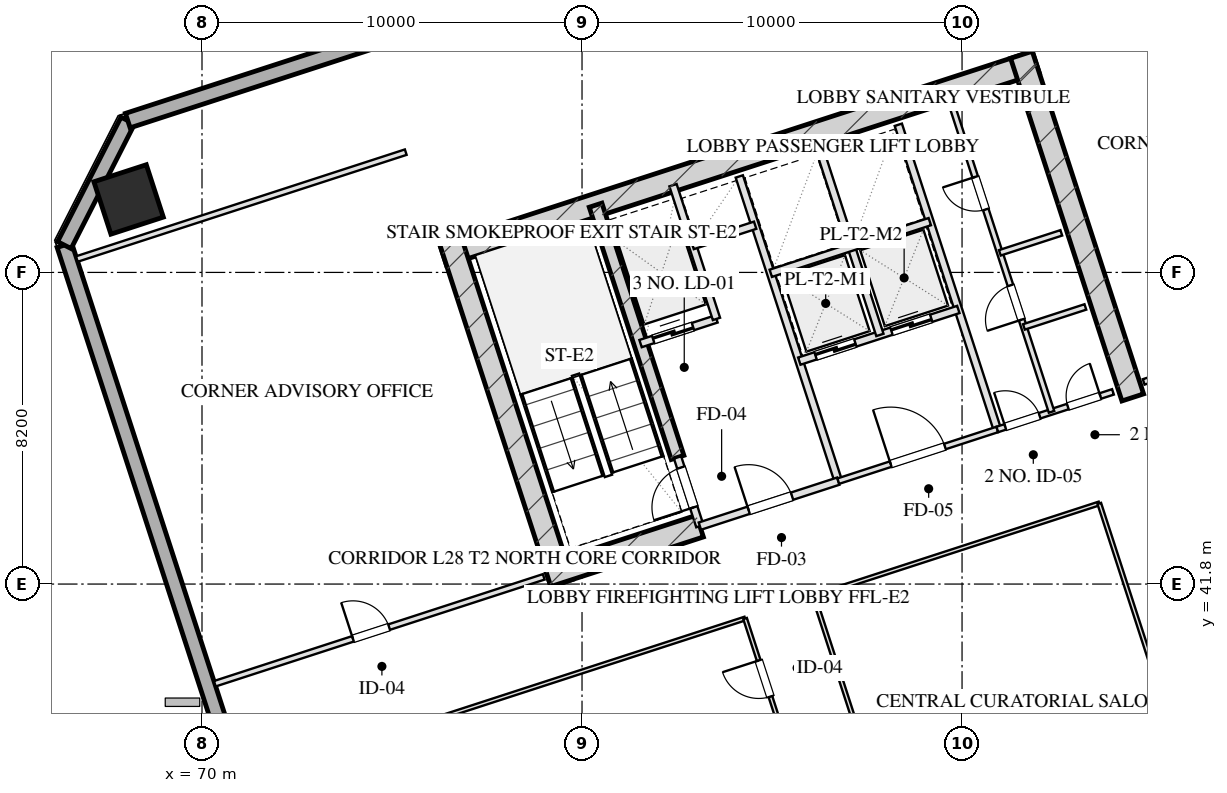
"""IFC4 building model, lengths in metres.
Left out: names, types, materials, properties, quantities, classifications, styles, units other than length and angle.
Written with IfcOpenShell. Run it as: python <this file> out.ifc"""

import sys

from ifc_helpers import new_model, si_unit, direction, frame, frame_2d, origin, origin_2d, place, context, subcontext, project, spatial, rectangle, hollow_rectangle, extrude, element, fill, save


model = new_model("IFC4")
c1 = context("Model", 3, precision=1e-05, world=origin(), true_north=direction((0.0, 1.0)))
c2 = subcontext(c1, "Body", "Model", "MODEL_VIEW")
j1 = project(units=[si_unit("LENGTHUNIT", "METRE"), si_unit("PLANEANGLEUNIT", "RADIAN")], contexts=[c1])
p1 = place(None, origin())
s1 = spatial("IfcSite", under=j1, at=p1, CompositionType="ELEMENT")
p2 = place(p1, origin())
s2 = spatial("IfcBuilding", under=s1, at=p2, CompositionType="ELEMENT")
p3 = place(p2, frame((0.0, 0.0, 110.4)))
s3 = spatial("IfcBuildingStorey", under=s2, at=p3, CompositionType="ELEMENT", Elevation=110.4)
p4 = place(p3, frame((76.344, 50.466, 0.0), z_axis=(0.0, 0.0, 1.0), x_axis=(0.951055727519, 0.309019421968, 0.0)))
e1 = element("IfcWall", 1, at=p4, inside=s3, PredefinedType="SHEAR", context=c2, shape_type="SweptSolid", body=[
    extrude(rectangle(XDim=16.4, YDim=0.6, at=frame_2d((8.2, 0.0))), origin(), (0.0, 0.0, 1.0), 3.45),
])
for number, where, z_axis, x_axis in (
    (2, (79.466, 41.828, 0.0), (0.0, 0.0, 1.0), (-0.309, 0.951, 0.0)),
    (3, (94.492, 46.71, 0.0), (0.0, 0.0, 1.0), (-0.309, 0.951, 0.0)),
):
    element("IfcWall", number, at=place(p3, frame(where, z_axis=z_axis, x_axis=x_axis)), inside=s3, PredefinedType="SHEAR", context=c2, shape_type="SweptSolid", body=[
        extrude(rectangle(XDim=9.48, YDim=0.6, at=frame_2d((4.74, 0.0))), origin(), (0.0, 0.0, 1.0), 3.45),
    ])
p5 = place(p3, frame((82.514, 45.131, 0.0), z_axis=(0.0, 0.0, 1.0), x_axis=(-0.308988790936, 0.951065679686, 0.0)))
e4 = element("IfcWall", 4, at=p5, inside=s3, PredefinedType="SHEAR", context=c2, shape_type="SweptSolid", body=[
    extrude(rectangle(XDim=6.98, YDim=0.35, at=frame_2d((3.49, 0.0))), origin(), (0.0, 0.0, 1.0), 3.45),
])
p6 = place(p3, frame((79.087, 42.021, 0.0), z_axis=(0.0, 0.0, 1.0), x_axis=(0.951062550203, 0.3089984233, 0.0)))
e5 = element("IfcWall", 5, at=p6, inside=s3, PredefinedType="SHEAR", context=c2, shape_type="SweptSolid", body=[
    extrude(rectangle(XDim=4.22, YDim=0.6, at=frame_2d((2.11, 0.0))), origin(), (0.0, 0.0, 1.0), 3.45),
])
p7 = place(p3, frame((68.069, 51.92, 0.0), z_axis=(0.0, 0.0, 1.0), x_axis=(0.951056516295, 0.309016994375, 0.0)))
e6 = element("IfcColumn", 6, at=p7, inside=s3, PredefinedType="COLUMN", context=c2, shape_type="SweptSolid", body=[
    extrude(hollow_rectangle(XDim=1.45, YDim=1.45, WallThickness=0.05, at=origin_2d()), origin(), (0.0, 0.0, 1.0), 3.451),
])
p8 = place(p3, frame((80.716, 6.59, 0.0), z_axis=(0.0, 0.0, 1.0), x_axis=(-0.309017542002, 0.95105633836, 0.0)))
e7 = element("IfcWall", 7, at=p8, inside=s3, PredefinedType="SOLIDWALL", context=c2, shape_type="SweptSolid", body=[
    extrude(rectangle(XDim=46.4, YDim=0.4, at=frame_2d((23.2, 0.0))), origin(), (0.0, 0.0, 1.0), 2.61),
])
p9 = place(p8, frame((20.05, 0.0, 0.0)))
e8 = element("IfcOpeningElement", 8, at=p9, cuts=e7, PredefinedType="OPENING", context=c2, shape_type="SweptSolid", body=[
    extrude(rectangle(XDim=1.1, YDim=2.15, at=frame_2d((0.55, 1.075))), frame((0.0, 0.21, 0.0), z_axis=(0.0, -1.0, 0.0), x_axis=(1.0, 0.0, 0.0)), (0.0, 0.0, 1.0), 0.42),
])
p10 = place(p3, frame((66.377, 50.719, 0.0), z_axis=(0.0, 0.0, 1.0), x_axis=(0.454026238093, 0.890988313685, 0.0)))
e9 = element("IfcWall", 9, at=p10, inside=s3, PredefinedType="SOLIDWALL", context=c2, shape_type="SweptSolid", body=[
    extrude(rectangle(XDim=3.677, YDim=0.4, at=frame_2d((1.838, 0.0))), origin(), (0.0, 0.0, 1.0), 2.61),
])
p11 = place(p3, frame((68.047, 53.995, 0.0), z_axis=(0.0, 0.0, 1.0), x_axis=(0.95105505922, 0.309021478754, 0.0)))
e10 = element("IfcWall", 10, at=p11, inside=s3, PredefinedType="SOLIDWALL", context=c2, shape_type="SweptSolid", body=[
    extrude(rectangle(XDim=29.4, YDim=0.4, at=frame_2d((14.7, 0.0))), origin(), (0.0, 0.0, 1.0), 2.61),
])
p12 = place(p3, frame((83.101, 43.324, 0.0), z_axis=(0.0, 0.0, 1.0), x_axis=(-0.309048298632, 0.951046344356, 0.0)))
e11 = element("IfcWall", 11, at=p12, inside=s3, PredefinedType="PARTITIONING", context=c2, shape_type="SweptSolid", body=[
    extrude(rectangle(XDim=1.9, YDim=0.2, at=frame_2d((0.95, 0.0))), origin(), (0.0, 0.0, 1.0), 3.175),
])
p13 = place(p12, frame((0.52, 0.0, 0.0)))
e12 = element("IfcOpeningElement", 12, at=p13, cuts=e11, PredefinedType="OPENING", context=c2, shape_type="SweptSolid", body=[
    extrude(rectangle(XDim=1.1, YDim=2.05, at=frame_2d((0.55, 1.025))), frame((0.0, 0.11, 0.0), z_axis=(0.0, -1.0, 0.0), x_axis=(1.0, 0.0, 0.0)), (0.0, 0.0, 1.0), 0.22),
])
p14 = place(p3, frame((86.743, 44.508, 0.0), z_axis=(0.0, 0.0, 1.0), x_axis=(-0.309016001439, 0.951056838919, 0.0)))
e13 = element("IfcWall", 13, at=p14, inside=s3, PredefinedType="PARTITIONING", context=c2, shape_type="SweptSolid", body=[
    extrude(rectangle(XDim=8.43, YDim=0.2, at=frame_2d((4.215, 0.0))), origin(), (0.0, 0.0, 1.0), 3.175),
])
p15 = place(p3, frame((83.101, 43.324, 0.0), z_axis=(0.0, 0.0, 1.0), x_axis=(0.951052804469, 0.309028417967, 0.0)))
e14 = element("IfcWall", 14, at=p15, inside=s3, PredefinedType="PARTITIONING", context=c2, shape_type="SweptSolid", body=[
    extrude(rectangle(XDim=3.83, YDim=0.2, at=frame_2d((1.915, 0.0))), origin(), (0.0, 0.0, 1.0), 3.175),
])
p16 = place(p15, frame((1.35, 0.0, 0.0)))
e15 = element("IfcOpeningElement", 15, at=p16, cuts=e14, PredefinedType="OPENING", context=c2, shape_type="SweptSolid", body=[
    extrude(rectangle(XDim=1.2, YDim=2.05, at=frame_2d((0.6, 1.025))), frame((0.0, 0.11, 0.0), z_axis=(0.0, -1.0, 0.0), x_axis=(1.0, 0.0, 0.0)), (0.0, 0.0, 1.0), 0.22),
])
p17 = place(p3, frame((81.54, 48.127, 0.0), z_axis=(0.0, 0.0, 1.0), x_axis=(0.951062257173, 0.308999325213, 0.0)))
e16 = element("IfcWall", 16, at=p17, inside=s3, PredefinedType="PARTITIONING", context=c2, shape_type="SweptSolid", body=[
    extrude(rectangle(XDim=2.1, YDim=0.2, at=frame_2d((1.05, 0.0))), origin(), (0.0, 0.0, 1.0), 3.175),
])
p18 = place(p17, frame((0.35, 0.0, 0.0)))
e17 = element("IfcOpeningElement", 17, at=p18, cuts=e16, PredefinedType="OPENING", context=c2, shape_type="SweptSolid", body=[
    extrude(rectangle(XDim=1.1, YDim=2.05, at=frame_2d((0.55, 1.025))), frame((0.0, 0.11, 0.0), z_axis=(0.0, -1.0, 0.0), x_axis=(1.0, 0.0, 0.0)), (0.0, 0.0, 1.0), 0.22),
])
p19 = place(p3, frame((83.538, 48.776, 0.0), z_axis=(0.0, 0.0, 1.0), x_axis=(-0.3089935693, 0.951064127245, 0.0)))
e18 = element("IfcWall", 18, at=p19, inside=s3, PredefinedType="PARTITIONING", context=c2, shape_type="SweptSolid", body=[
    extrude(rectangle(XDim=3.7, YDim=0.2, at=frame_2d((1.85, 0.0))), origin(), (0.0, 0.0, 1.0), 3.175),
])
p20 = place(p3, frame((82.91, 50.707, 0.0), z_axis=(0.0, 0.0, 1.0), x_axis=(0.951041328149, 0.309063734775, 0.0)))
e19 = element("IfcWall", 19, at=p20, inside=s3, PredefinedType="PARTITIONING", context=c2, shape_type="SweptSolid", body=[
    extrude(rectangle(XDim=1.73, YDim=0.2, at=frame_2d((0.865, 0.0))), origin(), (0.0, 0.0, 1.0), 3.175),
])
p21 = place(p3, frame((90.928, 45.868, 0.0), z_axis=(0.0, 0.0, 1.0), x_axis=(-0.309042196757, 0.951048327176, 0.0)))
e20 = element("IfcWall", 20, at=p21, inside=s3, PredefinedType="PARTITIONING", context=c2, shape_type="SweptSolid", body=[
    extrude(rectangle(XDim=8.43, YDim=0.2, at=frame_2d((4.215, 0.0))), origin(), (0.0, 0.0, 1.0), 3.175),
])
p22 = place(p3, frame((86.743, 44.508, 0.0), z_axis=(0.0, 0.0, 1.0), x_axis=(0.951063829732, 0.308994485023, 0.0)))
e21 = element("IfcWall", 21, at=p22, inside=s3, PredefinedType="PARTITIONING", context=c2, shape_type="SweptSolid", body=[
    extrude(rectangle(XDim=4.4, YDim=0.15, at=frame_2d((2.2, 0.0))), origin(), (0.0, 0.0, 1.0), 3.175),
])
p23 = place(p22, frame((1.45, 0.0, 0.0)))
e22 = element("IfcOpeningElement", 22, at=p23, cuts=e21, PredefinedType="OPENING", context=c2, shape_type="SweptSolid", body=[
    extrude(rectangle(XDim=1.5, YDim=2.05, at=frame_2d((0.75, 1.025))), frame((0.0, 0.085, 0.0), z_axis=(0.0, -1.0, 0.0), x_axis=(1.0, 0.0, 0.0)), (0.0, 0.0, 1.0), 0.17),
])
p24 = place(p3, frame((85.718, 47.666, 0.0), z_axis=(0.0, 0.0, 1.0), x_axis=(0.951058531764, 0.30901079133, 0.0)))
e23 = element("IfcWall", 23, at=p24, inside=s3, PredefinedType="PARTITIONING", context=c2, shape_type="SweptSolid", body=[
    extrude(rectangle(XDim=4.4, YDim=0.2, at=frame_2d((2.2, 0.0))), origin(), (0.0, 0.0, 1.0), 3.175),
])
p25 = place(p24, frame((0.45, 0.0, 0.0)))
e24 = element("IfcOpeningElement", 24, at=p25, cuts=e23, PredefinedType="OPENING", context=c2, shape_type="SweptSolid", body=[
    extrude(rectangle(XDim=1.1, YDim=2.05, at=frame_2d((0.55, 1.025))), frame((0.0, 0.11, 0.0), z_axis=(0.0, -1.0, 0.0), x_axis=(1.0, 0.0, 0.0)), (0.0, 0.0, 1.0), 0.22),
])
p26 = place(p24, frame((2.55, 0.0, 0.0)))
e25 = element("IfcOpeningElement", 25, at=p26, cuts=e23, PredefinedType="OPENING", context=c2, shape_type="SweptSolid", body=[
    extrude(rectangle(XDim=1.1, YDim=2.05, at=frame_2d((0.55, 1.025))), frame((0.0, 0.11, 0.0), z_axis=(0.0, -1.0, 0.0), x_axis=(1.0, 0.0, 0.0)), (0.0, 0.0, 1.0), 0.22),
])
p27 = place(p3, frame((87.838, 48.354, 0.0), z_axis=(0.0, 0.0, 1.0), x_axis=(-0.3090093719, 0.951058992953, 0.0)))
e26 = element("IfcWall", 26, at=p27, inside=s3, PredefinedType="PARTITIONING", context=c2, shape_type="SweptSolid", body=[
    extrude(rectangle(XDim=5.11, YDim=0.2, at=frame_2d((2.555, 0.0))), origin(), (0.0, 0.0, 1.0), 3.175),
])
p28 = place(p3, frame((84.967, 49.977, 0.0), z_axis=(0.0, 0.0, 1.0), x_axis=(0.951063829732, 0.308994485023, 0.0)))
e27 = element("IfcWall", 27, at=p28, inside=s3, PredefinedType="PARTITIONING", context=c2, shape_type="SweptSolid", body=[
    extrude(rectangle(XDim=4.4, YDim=0.2, at=frame_2d((2.2, 0.0))), origin(), (0.0, 0.0, 1.0), 3.175),
])
p29 = place(p3, frame((90.928, 45.868, 0.0), z_axis=(0.0, 0.0, 1.0), x_axis=(0.951059297078, 0.309008435874, 0.0)))
e28 = element("IfcWall", 28, at=p29, inside=s3, PredefinedType="PARTITIONING", context=c2, shape_type="SweptSolid", body=[
    extrude(rectangle(XDim=3.2, YDim=0.15, at=frame_2d((1.6, 0.0))), origin(), (0.0, 0.0, 1.0), 3.175),
])
p30 = place(p29, frame((0.22, 0.0, 0.0)))
e29 = element("IfcOpeningElement", 29, at=p30, cuts=e28, PredefinedType="OPENING", context=c2, shape_type="SweptSolid", body=[
    extrude(rectangle(XDim=0.95, YDim=2.05, at=frame_2d((0.475, 1.025))), frame((0.0, 0.085, 0.0), z_axis=(0.0, -1.0, 0.0), x_axis=(1.0, 0.0, 0.0)), (0.0, 0.0, 1.0), 0.17),
])
p31 = place(p29, frame((1.95, 0.0, 0.0)))
e30 = element("IfcOpeningElement", 30, at=p31, cuts=e28, PredefinedType="OPENING", context=c2, shape_type="SweptSolid", body=[
    extrude(rectangle(XDim=0.9, YDim=2.05, at=frame_2d((0.45, 1.025))), frame((0.0, 0.085, 0.0), z_axis=(0.0, -1.0, 0.0), x_axis=(1.0, 0.0, 0.0)), (0.0, 0.0, 1.0), 0.17),
])
p32 = place(p3, frame((92.355, 46.331, 0.0), z_axis=(0.0, 0.0, 1.0), x_axis=(-0.309007490203, 0.951059604335, 0.0)))
e31 = element("IfcWall", 31, at=p32, inside=s3, PredefinedType="PARTITIONING", context=c2, shape_type="SweptSolid", body=[
    extrude(rectangle(XDim=8.43, YDim=0.15, at=frame_2d((4.215, 0.0))), origin(), (0.0, 0.0, 1.0), 3.175),
])
p33 = place(p32, frame((2.55, 0.0, 0.0)))
e32 = element("IfcOpeningElement", 32, at=p33, cuts=e31, PredefinedType="OPENING", context=c2, shape_type="SweptSolid", body=[
    extrude(rectangle(XDim=0.95, YDim=2.05, at=frame_2d((0.475, 1.025))), frame((0.0, 0.085, 0.0), z_axis=(0.0, -1.0, 0.0), x_axis=(1.0, 0.0, 0.0)), (0.0, 0.0, 1.0), 0.17),
])
p34 = place(p32, frame((5.6, 0.0, 0.0)))
e33 = element("IfcOpeningElement", 33, at=p34, cuts=e31, PredefinedType="OPENING", context=c2, shape_type="SweptSolid", body=[
    extrude(rectangle(XDim=0.9, YDim=2.05, at=frame_2d((0.45, 1.025))), frame((0.0, 0.085, 0.0), z_axis=(0.0, -1.0, 0.0), x_axis=(1.0, 0.0, 0.0)), (0.0, 0.0, 1.0), 0.17),
])
p35 = place(p3, frame((90.995, 50.516, 0.0), z_axis=(0.0, 0.0, 1.0), x_axis=(0.951040401051, 0.309066587596, 0.0)))
e34 = element("IfcWall", 34, at=p35, inside=s3, PredefinedType="PARTITIONING", context=c2, shape_type="SweptSolid", body=[
    extrude(rectangle(XDim=1.7, YDim=0.15, at=frame_2d((0.85, 0.0))), origin(), (0.0, 0.0, 1.0), 3.175),
])
p36 = place(p3, frame((91.628, 48.566, 0.0), z_axis=(0.0, 0.0, 1.0), x_axis=(0.951054116971, 0.309024378638, 0.0)))
e35 = element("IfcWall", 35, at=p36, inside=s3, PredefinedType="PARTITIONING", context=c2, shape_type="SweptSolid", body=[
    extrude(rectangle(XDim=1.7, YDim=0.15, at=frame_2d((0.85, 0.0))), origin(), (0.0, 0.0, 1.0), 3.175),
])
p37 = place(p3, frame((66.707, 50.352, 0.0), z_axis=(0.0, 0.0, 1.0), x_axis=(0.951057133767, 0.309015093986, 0.0)))
e36 = element("IfcWall", 36, at=p37, inside=s3, PredefinedType="PARTITIONING", context=c2, shape_type="SweptSolid", body=[
    extrude(rectangle(XDim=9.1, YDim=0.15, at=frame_2d((4.55, 0.0))), origin(), (0.0, 0.0, 1.0), 3.175),
])
p38 = place(p3, frame((70.338, 39.177, 0.0), z_axis=(0.0, 0.0, 1.0), x_axis=(0.951059695568, 0.309007209409, 0.0)))
e37 = element("IfcWall", 37, at=p38, inside=s3, PredefinedType="PARTITIONING", context=c2, shape_type="SweptSolid", body=[
    extrude(rectangle(XDim=9.1, YDim=0.15, at=frame_2d((4.55, 0.0))), origin(), (0.0, 0.0, 1.0), 3.175),
])
p39 = place(p38, frame((3.822, 0.0, 0.0)))
e38 = element("IfcOpeningElement", 38, at=p39, cuts=e37, PredefinedType="OPENING", context=c2, shape_type="SweptSolid", body=[
    extrude(rectangle(XDim=1.0, YDim=2.05, at=frame_2d((0.5, 1.025))), frame((0.0, 0.085, 0.0), z_axis=(0.0, -1.0, 0.0), x_axis=(1.0, 0.0, 0.0)), (0.0, 0.0, 1.0), 0.17),
])
p40 = place(p3, frame((94.78, 47.119, 0.0), z_axis=(0.0, 0.0, 1.0), x_axis=(0.951054329824, 0.309023723562, 0.0)))
e39 = element("IfcWall", 39, at=p40, inside=s3, PredefinedType="PARTITIONING", context=c2, shape_type="SweptSolid", body=[
    extrude(rectangle(XDim=8.5, YDim=0.15, at=frame_2d((4.25, 0.0))), origin(), (0.0, 0.0, 1.0), 3.175),
])
p41 = place(p40, frame((3.57, 0.0, 0.0)))
e40 = element("IfcOpeningElement", 40, at=p41, cuts=e39, PredefinedType="OPENING", context=c2, shape_type="SweptSolid", body=[
    extrude(rectangle(XDim=1.05, YDim=2.05, at=frame_2d((0.525, 1.025))), frame((0.0, 0.085, 0.0), z_axis=(0.0, -1.0, 0.0), x_axis=(1.0, 0.0, 0.0)), (0.0, 0.0, 1.0), 0.17),
])
p42 = place(p3, frame((71.166, 36.629, 0.0), z_axis=(0.0, 0.0, 1.0), x_axis=(0.951056688031, 0.309016465825, 0.0)))
e41 = element("IfcWall", 41, at=p42, inside=s3, PredefinedType="MOVABLE", context=c2, shape_type="SweptSolid", body=[
    extrude(rectangle(XDim=13.8, YDim=0.1, at=frame_2d((6.9, 0.0))), origin(), (0.0, 0.0, 1.0), 3.175),
])
p43 = place(p3, frame((86.097, 41.48, 0.0), z_axis=(0.0, 0.0, 1.0), x_axis=(0.951060182336, 0.309005711233, 0.0)))
e42 = element("IfcWall", 42, at=p43, inside=s3, PredefinedType="MOVABLE", context=c2, shape_type="SweptSolid", body=[
    extrude(rectangle(XDim=7.9, YDim=0.1, at=frame_2d((3.95, 0.0))), origin(), (0.0, 0.0, 1.0), 3.175),
])
p44 = place(p3, frame((89.433, 25.067, 0.0), z_axis=(0.0, 0.0, 1.0), x_axis=(-0.30901773025, 0.951056277195, 0.0)))
e43 = element("IfcWall", 43, at=p44, inside=s3, PredefinedType="MOVABLE", context=c2, shape_type="SweptSolid", body=[
    extrude(rectangle(XDim=16.64, YDim=0.1, at=frame_2d((8.32, 0.0))), origin(), (0.0, 0.0, 1.0), 3.175),
])
p45 = place(p44, frame((1.16, 0.0, 0.0)))
e44 = element("IfcOpeningElement", 44, at=p45, cuts=e43, PredefinedType="OPENING", context=c2, shape_type="SweptSolid", body=[
    extrude(rectangle(XDim=1.0, YDim=2.05, at=frame_2d((0.5, 1.025))), frame((0.0, 0.06, 0.0), z_axis=(0.0, -1.0, 0.0), x_axis=(1.0, 0.0, 0.0)), (0.0, 0.0, 1.0), 0.12),
])
p46 = place(p44, frame((6.16, 0.0, 0.0)))
e45 = element("IfcOpeningElement", 45, at=p46, cuts=e43, PredefinedType="OPENING", context=c2, shape_type="SweptSolid", body=[
    extrude(rectangle(XDim=1.0, YDim=2.05, at=frame_2d((0.5, 1.025))), frame((0.0, 0.06, 0.0), z_axis=(0.0, -1.0, 0.0), x_axis=(1.0, 0.0, 0.0)), (0.0, 0.0, 1.0), 0.12),
])
p47 = place(p44, frame((10.16, 0.0, 0.0)))
e46 = element("IfcOpeningElement", 46, at=p47, cuts=e43, PredefinedType="OPENING", context=c2, shape_type="SweptSolid", body=[
    extrude(rectangle(XDim=1.0, YDim=2.05, at=frame_2d((0.5, 1.025))), frame((0.0, 0.06, 0.0), z_axis=(0.0, -1.0, 0.0), x_axis=(1.0, 0.0, 0.0)), (0.0, 0.0, 1.0), 0.12),
])
p48 = place(p44, frame((14.48, 0.0, 0.0)))
e47 = element("IfcOpeningElement", 47, at=p48, cuts=e43, PredefinedType="OPENING", context=c2, shape_type="SweptSolid", body=[
    extrude(rectangle(XDim=1.0, YDim=2.05, at=frame_2d((0.5, 1.025))), frame((0.0, 0.06, 0.0), z_axis=(0.0, -1.0, 0.0), x_axis=(1.0, 0.0, 0.0)), (0.0, 0.0, 1.0), 0.12),
])
p49 = place(p3, frame((91.24, 25.655, 0.0), z_axis=(0.0, 0.0, 1.0), x_axis=(-0.30901773025, 0.951056277195, 0.0)))
e48 = element("IfcWall", 48, at=p49, inside=s3, PredefinedType="MOVABLE", context=c2, shape_type="SweptSolid", body=[
    extrude(rectangle(XDim=16.64, YDim=0.1, at=frame_2d((8.32, 0.0))), origin(), (0.0, 0.0, 1.0), 3.175),
])
p50 = place(p49, frame((3.204, 0.0, 0.0)))
e49 = element("IfcOpeningElement", 49, at=p50, cuts=e48, PredefinedType="OPENING", context=c2, shape_type="SweptSolid", body=[
    extrude(rectangle(XDim=1.1, YDim=2.05, at=frame_2d((0.55, 1.025))), frame((0.0, 0.06, 0.0), z_axis=(0.0, -1.0, 0.0), x_axis=(1.0, 0.0, 0.0)), (0.0, 0.0, 1.0), 0.12),
])
p51 = place(p49, frame((11.404, 0.0, 0.0)))
e50 = element("IfcOpeningElement", 50, at=p51, cuts=e48, PredefinedType="OPENING", context=c2, shape_type="SweptSolid", body=[
    extrude(rectangle(XDim=1.1, YDim=2.05, at=frame_2d((0.55, 1.025))), frame((0.0, 0.06, 0.0), z_axis=(0.0, -1.0, 0.0), x_axis=(1.0, 0.0, 0.0)), (0.0, 0.0, 1.0), 0.12),
])
p52 = place(p3, frame((98.753, 28.096, 0.0), z_axis=(0.0, 0.0, 1.0), x_axis=(-0.30901773025, 0.951056277195, 0.0)))
e51 = element("IfcWall", 51, at=p52, inside=s3, PredefinedType="MOVABLE", context=c2, shape_type="SweptSolid", body=[
    extrude(rectangle(XDim=16.64, YDim=0.1, at=frame_2d((8.32, 0.0))), origin(), (0.0, 0.0, 1.0), 3.175),
])
p53 = place(p13, origin())
e52 = element("IfcDoor", 52, at=p53, inside=s3, OperationType="SINGLE_SWING_LEFT", PredefinedType="DOOR", context=c2, shape_type="SweptSolid", body=[
    extrude(rectangle(XDim=1.1, YDim=2.05, at=frame_2d((0.55, 1.025))), frame((0.0, 0.025, 0.0), z_axis=(0.0, -1.0, 0.0), x_axis=(1.0, 0.0, 0.0)), (0.0, 0.0, 1.0), 0.05),
])
fill(e12, e52)
p54 = place(p16, origin())
e53 = element("IfcDoor", 53, at=p54, inside=s3, OperationType="SINGLE_SWING_LEFT", PredefinedType="DOOR", context=c2, shape_type="SweptSolid", body=[
    extrude(rectangle(XDim=1.2, YDim=2.05, at=frame_2d((0.6, 1.025))), frame((0.0, 0.025, 0.0), z_axis=(0.0, -1.0, 0.0), x_axis=(1.0, 0.0, 0.0)), (0.0, 0.0, 1.0), 0.05),
])
fill(e15, e53)
p55 = place(p18, origin())
e54 = element("IfcDoor", 54, at=p55, inside=s3, OperationType="DOUBLE_DOOR_SLIDING", PredefinedType="DOOR", context=c2, shape_type="SweptSolid", body=[
    extrude(rectangle(XDim=1.1, YDim=2.05, at=frame_2d((0.55, 1.025))), frame((0.0, 0.025, 0.0), z_axis=(0.0, -1.0, 0.0), x_axis=(1.0, 0.0, 0.0)), (0.0, 0.0, 1.0), 0.05),
])
fill(e17, e54)
p56 = place(p23, origin())
e55 = element("IfcDoor", 55, at=p56, inside=s3, OperationType="SINGLE_SWING_LEFT", PredefinedType="DOOR", context=c2, shape_type="SweptSolid", body=[
    extrude(rectangle(XDim=1.5, YDim=2.05, at=frame_2d((0.75, 1.025))), frame((0.0, 0.025, 0.0), z_axis=(0.0, -1.0, 0.0), x_axis=(1.0, 0.0, 0.0)), (0.0, 0.0, 1.0), 0.05),
])
fill(e22, e55)
p57 = place(p25, origin())
e56 = element("IfcDoor", 56, at=p57, inside=s3, OperationType="DOUBLE_DOOR_SLIDING", PredefinedType="DOOR", context=c2, shape_type="SweptSolid", body=[
    extrude(rectangle(XDim=1.1, YDim=2.05, at=frame_2d((0.55, 1.025))), frame((0.0, 0.025, 0.0), z_axis=(0.0, -1.0, 0.0), x_axis=(1.0, 0.0, 0.0)), (0.0, 0.0, 1.0), 0.05),
])
fill(e24, e56)
p58 = place(p26, origin())
e57 = element("IfcDoor", 57, at=p58, inside=s3, OperationType="DOUBLE_DOOR_SLIDING", PredefinedType="DOOR", context=c2, shape_type="SweptSolid", body=[
    extrude(rectangle(XDim=1.1, YDim=2.05, at=frame_2d((0.55, 1.025))), frame((0.0, 0.025, 0.0), z_axis=(0.0, -1.0, 0.0), x_axis=(1.0, 0.0, 0.0)), (0.0, 0.0, 1.0), 0.05),
])
fill(e25, e57)
p59 = place(p30, origin())
e58 = element("IfcDoor", 58, at=p59, inside=s3, OperationType="SINGLE_SWING_LEFT", PredefinedType="DOOR", context=c2, shape_type="SweptSolid", body=[
    extrude(rectangle(XDim=0.95, YDim=2.05, at=frame_2d((0.475, 1.025))), frame((0.0, 0.025, 0.0), z_axis=(0.0, -1.0, 0.0), x_axis=(1.0, 0.0, 0.0)), (0.0, 0.0, 1.0), 0.05),
])
fill(e29, e58)
p60 = place(p31, origin())
e59 = element("IfcDoor", 59, at=p60, inside=s3, OperationType="SINGLE_SWING_RIGHT", PredefinedType="DOOR", context=c2, shape_type="SweptSolid", body=[
    extrude(rectangle(XDim=0.9, YDim=2.05, at=frame_2d((0.45, 1.025))), frame((0.0, 0.025, 0.0), z_axis=(0.0, -1.0, 0.0), x_axis=(1.0, 0.0, 0.0)), (0.0, 0.0, 1.0), 0.05),
])
fill(e30, e59)
p61 = place(p33, origin())
e60 = element("IfcDoor", 60, at=p61, inside=s3, OperationType="SINGLE_SWING_LEFT", PredefinedType="DOOR", context=c2, shape_type="SweptSolid", body=[
    extrude(rectangle(XDim=0.95, YDim=2.05, at=frame_2d((0.475, 1.025))), frame((0.0, 0.025, 0.0), z_axis=(0.0, -1.0, 0.0), x_axis=(1.0, 0.0, 0.0)), (0.0, 0.0, 1.0), 0.05),
])
fill(e32, e60)
p62 = place(p34, origin())
e61 = element("IfcDoor", 61, at=p62, inside=s3, OperationType="SINGLE_SWING_RIGHT", PredefinedType="DOOR", context=c2, shape_type="SweptSolid", body=[
    extrude(rectangle(XDim=0.9, YDim=2.05, at=frame_2d((0.45, 1.025))), frame((0.0, 0.025, 0.0), z_axis=(0.0, -1.0, 0.0), x_axis=(1.0, 0.0, 0.0)), (0.0, 0.0, 1.0), 0.05),
])
fill(e33, e61)
p63 = place(p39, origin())
e62 = element("IfcDoor", 62, at=p63, inside=s3, OperationType="SINGLE_SWING_LEFT", PredefinedType="DOOR", context=c2, shape_type="SweptSolid", body=[
    extrude(rectangle(XDim=1.0, YDim=2.05, at=frame_2d((0.5, 1.025))), frame((0.0, 0.025, 0.0), z_axis=(0.0, -1.0, 0.0), x_axis=(1.0, 0.0, 0.0)), (0.0, 0.0, 1.0), 0.05),
])
fill(e38, e62)
p64 = place(p48, origin())
e63 = element("IfcDoor", 63, at=p64, inside=s3, OperationType="SINGLE_SWING_RIGHT", PredefinedType="DOOR", context=c2, shape_type="SweptSolid", body=[
    extrude(rectangle(XDim=1.0, YDim=2.05, at=frame_2d((0.5, 1.025))), frame((0.0, 0.025, 0.0), z_axis=(0.0, -1.0, 0.0), x_axis=(1.0, 0.0, 0.0)), (0.0, 0.0, 1.0), 0.05),
])
fill(e47, e63)
save(model, sys.argv[1])
